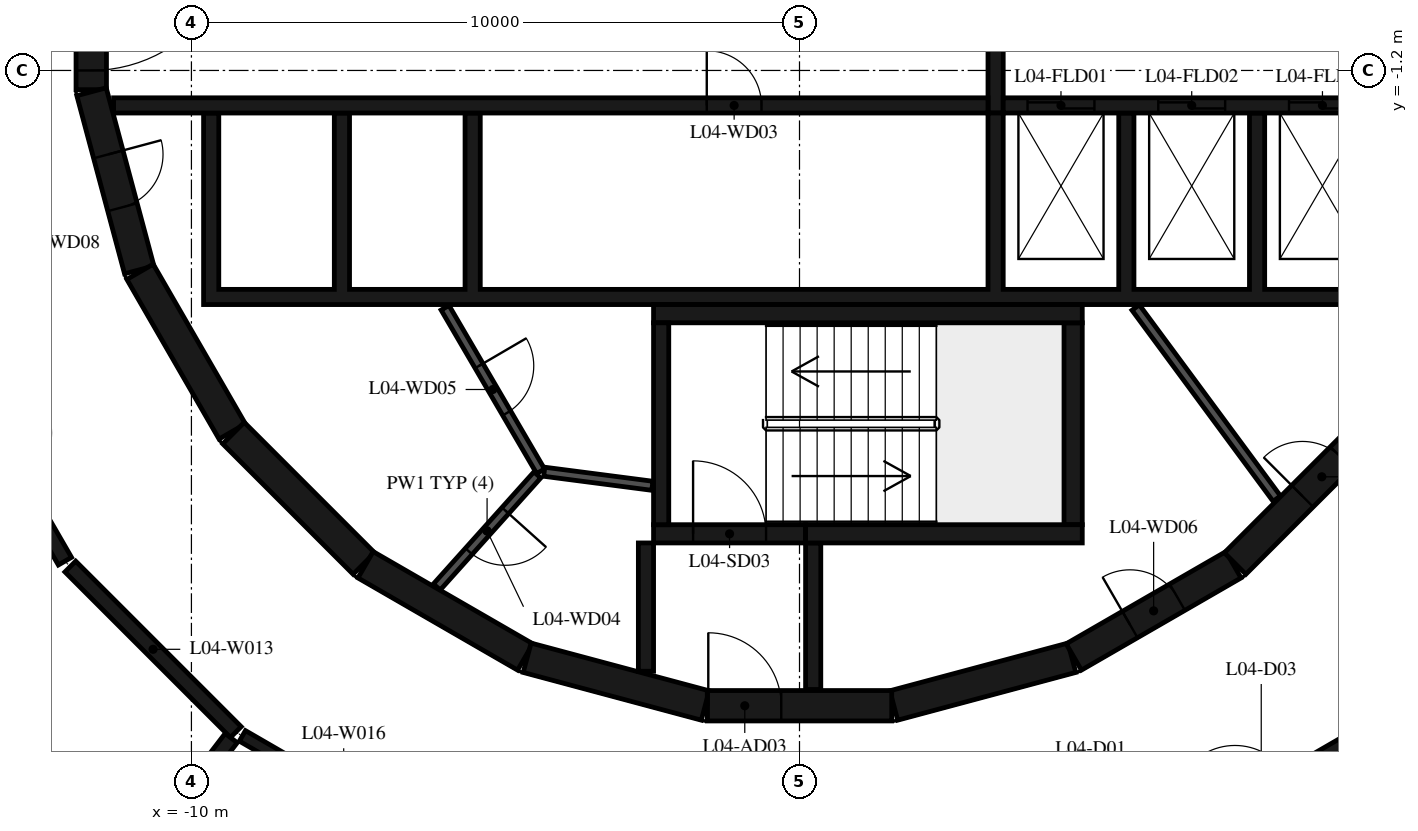
"""IFC4 building model, lengths in metres.
Left out: names, types, materials, properties, quantities, classifications, styles, units other than length and angle.
Written with IfcOpenShell. Run it as: python <this file> out.ifc"""

import sys

from ifc_helpers import new_model, si_unit, direction, frame, frame_2d, origin, place, context, subcontext, project, spatial, polyline, rectangle, outline, extrude, element, fill, save


model = new_model("IFC4")
c1 = context("Model", 3, precision=1e-05, world=origin(), true_north=direction((0.0, 1.0)))
c2 = subcontext(c1, "Body", "Model", "MODEL_VIEW")
j1 = project(units=[si_unit("LENGTHUNIT", "METRE"), si_unit("PLANEANGLEUNIT", "RADIAN")], contexts=[c1])
p1 = place(None, origin())
s1 = spatial("IfcSite", under=j1, at=p1, CompositionType="ELEMENT")
p2 = place(p1, origin())
s2 = spatial("IfcBuilding", under=s1, at=p2, CompositionType="ELEMENT")
p3 = place(p2, frame((0.0, 0.0, 23.4)))
s3 = spatial("IfcBuildingStorey", under=s2, at=p3, CompositionType="ELEMENT", Elevation=23.4)
p4 = place(p3, frame((1.55, -11.643, 0.0), z_axis=(0.0, 0.0, 1.0), x_axis=(0.965948410781, 0.258734743916, 0.0)))
e1 = element("IfcWall", 1, at=p4, inside=s3, PredefinedType="SHEAR", context=c2, shape_type="SweptSolid", body=[
    extrude(rectangle(XDim=3.033, YDim=0.5, at=frame_2d((1.516, 0.0))), origin(), (0.0, 0.0, 1.0), 4.42),
])
p5 = place(p3, frame((4.51, -10.845, 0.0), z_axis=(0.0, 0.0, 1.0), x_axis=(0.865975092491, 0.500087131594, 0.0)))
e2 = element("IfcWall", 2, at=p5, inside=s3, PredefinedType="SHEAR", context=c2, shape_type="SweptSolid", body=[
    extrude(rectangle(XDim=3.033, YDim=0.5, at=frame_2d((1.516, 0.0))), origin(), (0.0, 0.0, 1.0), 4.42),
])
p6 = place(p5, frame((1.066, 0.0, 0.0)))
e3 = element("IfcOpeningElement", 3, at=p6, cuts=e2, PredefinedType="OPENING", context=c2, shape_type="SweptSolid", body=[
    extrude(rectangle(XDim=0.9, YDim=2.1, at=frame_2d((0.45, 1.05))), frame((0.0, 0.26, 0.0), z_axis=(0.0, -1.0, 0.0), x_axis=(1.0, 0.0, 0.0)), (0.0, 0.0, 1.0), 0.52),
])
p7 = place(p3, frame((7.164, -9.308, 0.0), z_axis=(0.0, 0.0, 1.0), x_axis=(0.707106781187, 0.707106781187, 0.0)))
e4 = element("IfcWall", 4, at=p7, inside=s3, PredefinedType="SHEAR", context=c2, shape_type="SweptSolid", body=[
    extrude(rectangle(XDim=3.032, YDim=0.5, at=frame_2d((1.516, 0.0))), origin(), (0.0, 0.0, 1.0), 4.42),
])
p8 = place(p7, frame((1.566, 0.0, 0.0)))
e5 = element("IfcOpeningElement", 5, at=p8, cuts=e4, PredefinedType="OPENING", context=c2, shape_type="SweptSolid", body=[
    extrude(rectangle(XDim=0.9, YDim=2.1, at=frame_2d((0.45, 1.05))), frame((0.0, 0.26, 0.0), z_axis=(0.0, -1.0, 0.0), x_axis=(1.0, 0.0, 0.0)), (0.0, 0.0, 1.0), 0.52),
])
p9 = place(p3, frame((-11.647, 1.516, 0.0), z_axis=(0.0, 0.0, 1.0), x_axis=(0.0, -1.0, 0.0)))
e6 = element("IfcWall", 6, at=p9, inside=s3, PredefinedType="SHEAR", context=c2, shape_type="SweptSolid", body=[
    extrude(rectangle(XDim=3.033, YDim=0.5, at=frame_2d((1.516, 0.0))), origin(), (0.0, 0.0, 1.0), 4.42),
])
p10 = place(p9, frame((0.316, 0.0, 0.0)))
e7 = element("IfcOpeningElement", 7, at=p10, cuts=e6, PredefinedType="OPENING", context=c2, shape_type="SweptSolid", body=[
    extrude(rectangle(XDim=2.4, YDim=2.1, at=frame_2d((1.2, 1.05))), frame((0.0, 0.26, 0.0), z_axis=(0.0, -1.0, 0.0), x_axis=(1.0, 0.0, 0.0)), (0.0, 0.0, 1.0), 0.52),
])
p11 = place(p3, frame((-11.643, -1.55, 0.0), z_axis=(0.0, 0.0, 1.0), x_axis=(0.258734743916, -0.965948410781, 0.0)))
e8 = element("IfcWall", 8, at=p11, inside=s3, PredefinedType="SHEAR", context=c2, shape_type="SweptSolid", body=[
    extrude(rectangle(XDim=3.033, YDim=0.5, at=frame_2d((1.516, 0.0))), origin(), (0.0, 0.0, 1.0), 4.42),
])
p12 = place(p11, frame((1.066, 0.0, 0.0)))
e9 = element("IfcOpeningElement", 9, at=p12, cuts=e8, PredefinedType="OPENING", context=c2, shape_type="SweptSolid", body=[
    extrude(rectangle(XDim=0.9, YDim=2.1, at=frame_2d((0.45, 1.05))), frame((0.0, 0.26, 0.0), z_axis=(0.0, -1.0, 0.0), x_axis=(1.0, 0.0, 0.0)), (0.0, 0.0, 1.0), 0.52),
])
p13 = place(p3, frame((-10.845, -4.51, 0.0), z_axis=(0.0, 0.0, 1.0), x_axis=(0.500087131594, -0.865975092491, 0.0)))
e10 = element("IfcWall", 10, at=p13, inside=s3, PredefinedType="SHEAR", context=c2, shape_type="SweptSolid", body=[
    extrude(rectangle(XDim=3.033, YDim=0.5, at=frame_2d((1.516, 0.0))), origin(), (0.0, 0.0, 1.0), 4.42),
])
p14 = place(p3, frame((-9.308, -7.164, 0.0), z_axis=(0.0, 0.0, 1.0), x_axis=(0.707106781187, -0.707106781187, 0.0)))
e11 = element("IfcWall", 11, at=p14, inside=s3, PredefinedType="SHEAR", context=c2, shape_type="SweptSolid", body=[
    extrude(rectangle(XDim=3.032, YDim=0.5, at=frame_2d((1.516, 0.0))), origin(), (0.0, 0.0, 1.0), 4.42),
])
for number, where, z_axis, x_axis in (
    (12, (-7.137, -9.329, 0.0), (0.0, 0.0, 1.0), (0.866, -0.5, 0.0)),
    (13, (-4.479, -10.858, 0.0), (0.0, 0.0, 1.0), (0.966, -0.259, 0.0)),
):
    element("IfcWall", number, at=place(p3, frame(where, z_axis=z_axis, x_axis=x_axis)), inside=s3, PredefinedType="SHEAR", context=c2, shape_type="SweptSolid", body=[
        extrude(rectangle(XDim=3.033, YDim=0.5, at=frame_2d((1.516, 0.0))), origin(), (0.0, 0.0, 1.0), 4.42),
    ])
p15 = place(p3, frame((-1.516, -11.647, 0.0), z_axis=(0.0, 0.0, 1.0), x_axis=(1.0, 0.0, 0.0)))
e14 = element("IfcWall", 14, at=p15, inside=s3, PredefinedType="SHEAR", context=c2, shape_type="SweptSolid", body=[
    extrude(rectangle(XDim=3.033, YDim=0.5, at=frame_2d((1.516, 0.0))), origin(), (0.0, 0.0, 1.0), 4.42),
])
p16 = place(p15, frame((0.016, 0.0, 0.0)))
e15 = element("IfcOpeningElement", 15, at=p16, cuts=e14, PredefinedType="OPENING", context=c2, shape_type="SweptSolid", body=[
    extrude(rectangle(XDim=1.2, YDim=2.1, at=frame_2d((0.6, 1.05))), frame((0.0, 0.26, 0.0), z_axis=(0.0, -1.0, 0.0), x_axis=(1.0, 0.0, 0.0)), (0.0, 0.0, 1.0), 0.52),
])
p17 = place(p3, frame((-2.275, -8.67, 0.0), z_axis=(0.0, 0.0, 1.0), x_axis=(0.0, 1.0, 0.0)))
e16 = element("IfcWall", 16, at=p17, inside=s3, PredefinedType="SHEAR", context=c2, shape_type="SweptSolid", body=[
    extrude(rectangle(XDim=3.32, YDim=0.25, at=frame_2d((1.66, 0.0))), origin(), (0.0, 0.0, 1.0), 4.42),
])
p18 = place(p3, frame((-2.4, -5.2, 0.0), z_axis=(0.0, 0.0, 1.0), x_axis=(1.0, 0.0, 0.0)))
e17 = element("IfcWall", 17, at=p18, inside=s3, PredefinedType="SHEAR", context=c2, shape_type="SweptSolid", body=[
    extrude(rectangle(XDim=7.05, YDim=0.3, at=frame_2d((3.525, 0.0))), origin(), (0.0, 0.0, 1.0), 4.42),
])
p19 = place(p3, frame((4.5, -8.67, 0.0), z_axis=(0.0, 0.0, 1.0), x_axis=(0.0, 1.0, 0.0)))
e18 = element("IfcWall", 18, at=p19, inside=s3, PredefinedType="SHEAR", context=c2, shape_type="SweptSolid", body=[
    extrude(rectangle(XDim=3.32, YDim=0.3, at=frame_2d((1.66, 0.0))), origin(), (0.0, 0.0, 1.0), 4.42),
])
p20 = place(p3, frame((0.1, -8.82, 0.0), z_axis=(0.0, 0.0, 1.0), x_axis=(1.0, 0.0, 0.0)))
e19 = element("IfcWall", 19, at=p20, inside=s3, PredefinedType="SHEAR", context=c2, shape_type="SweptSolid", body=[
    extrude(rectangle(XDim=4.55, YDim=0.3, at=frame_2d((2.275, 0.0))), origin(), (0.0, 0.0, 1.0), 4.42),
])
p21 = place(p3, frame((-2.4, -8.82, 0.0), z_axis=(0.0, 0.0, 1.0), x_axis=(1.0, 0.0, 0.0)))
e20 = element("IfcWall", 20, at=p21, inside=s3, PredefinedType="SHEAR", context=c2, shape_type="SweptSolid", body=[
    extrude(rectangle(XDim=2.5, YDim=0.3, at=frame_2d((1.25, 0.0))), origin(), (0.0, 0.0, 1.0), 4.42),
])
p22 = place(p21, frame((0.65, 0.0, 0.0)))
e21 = element("IfcOpeningElement", 21, at=p22, cuts=e20, PredefinedType="OPENING", context=c2, shape_type="SweptSolid", body=[
    extrude(rectangle(XDim=1.2, YDim=2.1, at=frame_2d((0.6, 1.05))), frame((0.0, 0.16, 0.0), z_axis=(0.0, -1.0, 0.0), x_axis=(1.0, 0.0, 0.0)), (0.0, 0.0, 1.0), 0.32),
])
p23 = place(p3, frame((-2.525, -8.97, 0.0), z_axis=(0.0, 0.0, 1.0), x_axis=(0.0, -1.0, 0.0)))
e22 = element("IfcWall", 22, at=p23, inside=s3, PredefinedType="SHEAR", context=c2, shape_type="SweptSolid", body=[
    extrude(rectangle(XDim=2.11, YDim=0.25, at=frame_2d((1.055, 0.0))), origin(), (0.0, 0.0, 1.0), 4.42),
])
p24 = place(p3, frame((0.225, -8.97, 0.0), z_axis=(0.0, 0.0, 1.0), x_axis=(0.0, -1.0, 0.0)))
e23 = element("IfcWall", 23, at=p24, inside=s3, PredefinedType="SHEAR", context=c2, shape_type="SweptSolid", body=[
    extrude(rectangle(XDim=2.41, YDim=0.25, at=frame_2d((1.205, 0.0))), origin(), (0.0, 0.0, 1.0), 4.42),
])
p25 = place(p3, origin())
e24 = element("IfcWall", 24, at=p25, inside=s3, PredefinedType="SHEAR", context=c2, shape_type="SweptSolid", body=[
    extrude(outline(polyline([(9.8, -5.05), (9.8, -4.8), (9.8, -1.9), (9.55, -1.9), (9.55, -4.8), (7.65, -4.8), (7.65, -1.9), (7.4, -1.9), (7.4, -4.8), (5.5, -4.8), (5.5, -1.9), (5.25, -1.9), (5.25, -4.8), (3.35, -4.8), (3.35, -1.9), (3.1, -1.9), (3.1, -4.8), (-5.25, -4.8), (-5.25, -1.9), (-5.5, -1.9), (-5.5, -4.8), (-7.4, -4.8), (-7.4, -1.9), (-7.65, -1.9), (-7.65, -4.8), (-9.55, -4.8), (-9.55, -1.9), (-9.8, -1.9), (-9.8, -4.8), (-9.8, -5.05), (9.8, -5.05)])), origin(), (0.0, 0.0, 1.0), 4.42),
])
p26 = place(p3, frame((-11.28, -1.775, 0.0), z_axis=(0.0, 0.0, 1.0), x_axis=(1.0, 0.0, 0.0)))
e25 = element("IfcWall", 25, at=p26, inside=s3, PredefinedType="SHEAR", context=c2, shape_type="SweptSolid", body=[
    extrude(rectangle(XDim=14.38, YDim=0.25, at=frame_2d((7.19, 0.0))), origin(), (0.0, 0.0, 1.0), 4.42),
])
p27 = place(p26, frame((9.755, 0.0, 0.0)))
e26 = element("IfcOpeningElement", 26, at=p27, cuts=e25, PredefinedType="OPENING", context=c2, shape_type="SweptSolid", body=[
    extrude(rectangle(XDim=0.9, YDim=2.1, at=frame_2d((0.45, 1.05))), frame((0.0, 0.135, 0.0), z_axis=(0.0, -1.0, 0.0), x_axis=(1.0, 0.0, 0.0)), (0.0, 0.0, 1.0), 0.27),
])
p28 = place(p3, frame((3.35, -1.775, 0.0), z_axis=(0.0, 0.0, 1.0), x_axis=(1.0, 0.0, 0.0)))
e27 = element("IfcWall", 27, at=p28, inside=s3, PredefinedType="SHEAR", context=c2, shape_type="SweptSolid", body=[
    extrude(rectangle(XDim=7.93, YDim=0.25, at=frame_2d((3.965, 0.0))), origin(), (0.0, 0.0, 1.0), 4.42),
])
p29 = place(p28, frame((0.4, 0.0, 0.0)))
e28 = element("IfcOpeningElement", 28, at=p29, cuts=e27, PredefinedType="OPENING", context=c2, shape_type="SweptSolid", body=[
    extrude(rectangle(XDim=1.1, YDim=2.4, at=frame_2d((0.55, 1.2))), frame((0.0, 0.135, 0.0), z_axis=(0.0, -1.0, 0.0), x_axis=(1.0, 0.0, 0.0)), (0.0, 0.0, 1.0), 0.27),
])
p30 = place(p28, frame((2.55, 0.0, 0.0)))
e29 = element("IfcOpeningElement", 29, at=p30, cuts=e27, PredefinedType="OPENING", context=c2, shape_type="SweptSolid", body=[
    extrude(rectangle(XDim=1.1, YDim=2.4, at=frame_2d((0.55, 1.2))), frame((0.0, 0.135, 0.0), z_axis=(0.0, -1.0, 0.0), x_axis=(1.0, 0.0, 0.0)), (0.0, 0.0, 1.0), 0.27),
])
p31 = place(p28, frame((4.7, 0.0, 0.0)))
e30 = element("IfcOpeningElement", 30, at=p31, cuts=e27, PredefinedType="OPENING", context=c2, shape_type="SweptSolid", body=[
    extrude(rectangle(XDim=1.1, YDim=2.4, at=frame_2d((0.55, 1.2))), frame((0.0, 0.135, 0.0), z_axis=(0.0, -1.0, 0.0), x_axis=(1.0, 0.0, 0.0)), (0.0, 0.0, 1.0), 0.27),
])
p32 = place(p3, frame((3.225, -1.9, 0.0), z_axis=(0.0, 0.0, 1.0), x_axis=(0.0, 1.0, 0.0)))
e31 = element("IfcWall", 31, at=p32, inside=s3, PredefinedType="SHEAR", context=c2, shape_type="SweptSolid", body=[
    extrude(rectangle(XDim=3.8, YDim=0.25, at=frame_2d((1.9, 0.0))), origin(), (0.0, 0.0, 1.0), 4.42),
])
p33 = place(p3, frame((5.528, -5.098, 0.0), z_axis=(0.0, 0.0, 1.0), x_axis=(0.594034318069, -0.804439698769, 0.0)))
e32 = element("IfcWall", 32, at=p33, inside=s3, PredefinedType="PARTITIONING", context=c2, shape_type="SweptSolid", body=[
    extrude(rectangle(XDim=3.907, YDim=0.15, at=frame_2d((1.953, 0.0))), origin(), (0.0, 0.0, 1.0), 4.42),
])
p34 = place(p3, frame((-5.829, -5.102, 0.0), z_axis=(0.0, 0.0, 1.0), x_axis=(0.504480008384, -0.863423373057, 0.0)))
e33 = element("IfcWall", 33, at=p34, inside=s3, PredefinedType="PARTITIONING", context=c2, shape_type="SweptSolid", body=[
    extrude(rectangle(XDim=3.115, YDim=0.15, at=frame_2d((1.558, 0.0))), origin(), (0.0, 0.0, 1.0), 4.42),
])
p35 = place(p34, frame((1.107, 0.0, 0.0)))
e34 = element("IfcOpeningElement", 34, at=p35, cuts=e33, PredefinedType="OPENING", context=c2, shape_type="SweptSolid", body=[
    extrude(rectangle(XDim=0.9, YDim=2.1, at=frame_2d((0.45, 1.05))), frame((0.0, 0.085, 0.0), z_axis=(0.0, -1.0, 0.0), x_axis=(1.0, 0.0, 0.0)), (0.0, 0.0, 1.0), 0.17),
])
p36 = place(p3, frame((-4.311, -7.851, 0.0), z_axis=(0.0, 0.0, 1.0), x_axis=(-0.667869133096, -0.744278725383, 0.0)))
e35 = element("IfcWall", 35, at=p36, inside=s3, PredefinedType="PARTITIONING", context=c2, shape_type="SweptSolid", body=[
    extrude(rectangle(XDim=2.476, YDim=0.15, at=frame_2d((1.238, 0.0))), origin(), (0.0, 0.0, 1.0), 4.42),
])
p37 = place(p36, frame((0.788, 0.0, 0.0)))
e36 = element("IfcOpeningElement", 36, at=p37, cuts=e35, PredefinedType="OPENING", context=c2, shape_type="SweptSolid", body=[
    extrude(rectangle(XDim=0.9, YDim=2.1, at=frame_2d((0.45, 1.05))), frame((0.0, 0.085, 0.0), z_axis=(0.0, -1.0, 0.0), x_axis=(1.0, 0.0, 0.0)), (0.0, 0.0, 1.0), 0.17),
])
p38 = place(p3, frame((-4.198, -7.799, 0.0), z_axis=(0.0, 0.0, 1.0), x_axis=(0.991686747293, -0.128675542523, 0.0)))
e37 = element("IfcWall", 37, at=p38, inside=s3, PredefinedType="PARTITIONING", context=c2, shape_type="SweptSolid", body=[
    extrude(rectangle(XDim=1.793, YDim=0.15, at=frame_2d((0.896, 0.0))), origin(), (0.0, 0.0, 1.0), 4.42),
])
p39 = place(p3, frame((-14.02, -5.917, 0.0), z_axis=(0.0, 0.0, 1.0), x_axis=(0.500733182901, -0.865601686425, 0.0)))
e38 = element("IfcWall", 38, at=p39, inside=s3, PredefinedType="PARTITIONING", context=c2, shape_type="SweptSolid", body=[
    extrude(rectangle(XDim=3.874, YDim=0.25, at=frame_2d((1.937, 0.0))), origin(), (0.0, 0.0, 1.0), 4.42),
])
p40 = place(p39, frame((1.437, 0.0, 0.0)))
e39 = element("IfcOpeningElement", 39, at=p40, cuts=e38, PredefinedType="OPENING", context=c2, shape_type="SweptSolid", body=[
    extrude(rectangle(XDim=1.0, YDim=2.1, at=frame_2d((0.5, 1.05))), frame((0.0, 0.135, 0.0), z_axis=(0.0, -1.0, 0.0), x_axis=(1.0, 0.0, 0.0)), (0.0, 0.0, 1.0), 0.27),
])
p41 = place(p3, frame((-11.992, -9.358, 0.0), z_axis=(0.0, 0.0, 1.0), x_axis=(0.707106781187, -0.707106781187, 0.0)))
e40 = element("IfcWall", 40, at=p41, inside=s3, PredefinedType="PARTITIONING", context=c2, shape_type="SweptSolid", body=[
    extrude(rectangle(XDim=3.849, YDim=0.25, at=frame_2d((1.925, 0.0))), origin(), (0.0, 0.0, 1.0), 4.42),
])
p42 = place(p3, frame((-9.346, -12.179, 0.0), z_axis=(0.0, 0.0, 1.0), x_axis=(-0.608560359422, -0.793507585937, 0.0)))
e41 = element("IfcWall", 41, at=p42, inside=s3, PredefinedType="PARTITIONING", context=c2, shape_type="SweptSolid", body=[
    extrude(rectangle(XDim=9.39, YDim=0.25, at=frame_2d((4.695, 0.0))), origin(), (0.0, 0.0, 1.0), 4.42),
])
p43 = place(p3, frame((-9.162, -12.143, 0.0), z_axis=(0.0, 0.0, 1.0), x_axis=(0.865588360659, -0.500756218026, 0.0)))
e42 = element("IfcWall", 42, at=p43, inside=s3, PredefinedType="PARTITIONING", context=c2, shape_type="SweptSolid", body=[
    extrude(rectangle(XDim=3.849, YDim=0.2, at=frame_2d((1.925, 0.0))), origin(), (0.0, 0.0, 1.0), 4.42),
])
p44 = place(p3, frame((5.917, -14.02, 0.0), z_axis=(0.0, 0.0, 1.0), x_axis=(0.865601686425, 0.500733182901, 0.0)))
e43 = element("IfcWall", 43, at=p44, inside=s3, PredefinedType="PARTITIONING", context=c2, shape_type="SweptSolid", body=[
    extrude(rectangle(XDim=3.874, YDim=0.2, at=frame_2d((1.937, 0.0))), origin(), (0.0, 0.0, 1.0), 4.42),
])
p45 = place(p44, frame((1.437, 0.0, 0.0)))
e44 = element("IfcOpeningElement", 44, at=p45, cuts=e43, PredefinedType="OPENING", context=c2, shape_type="SweptSolid", body=[
    extrude(rectangle(XDim=1.0, YDim=2.1, at=frame_2d((0.5, 1.05))), frame((0.0, 0.11, 0.0), z_axis=(0.0, -1.0, 0.0), x_axis=(1.0, 0.0, 0.0)), (0.0, 0.0, 1.0), 0.22),
])
p46 = place(p22, origin())
e45 = element("IfcDoor", 45, at=p46, inside=s3, OperationType="SINGLE_SWING_LEFT", PredefinedType="DOOR", context=c2, shape_type="SweptSolid", body=[
    extrude(rectangle(XDim=1.2, YDim=2.1, at=frame_2d((0.6, 1.05))), frame((0.0, 0.025, 0.0), z_axis=(0.0, -1.0, 0.0), x_axis=(1.0, 0.0, 0.0)), (0.0, 0.0, 1.0), 0.05),
])
fill(e21, e45)
p47 = place(p16, origin())
e46 = element("IfcDoor", 46, at=p47, inside=s3, OperationType="SINGLE_SWING_RIGHT", PredefinedType="DOOR", context=c2, shape_type="SweptSolid", body=[
    extrude(rectangle(XDim=1.2, YDim=2.1, at=frame_2d((0.6, 1.05))), frame((0.0, 0.025, 0.0), z_axis=(0.0, -1.0, 0.0), x_axis=(1.0, 0.0, 0.0)), (0.0, 0.0, 1.0), 0.05),
])
fill(e15, e46)
p48 = place(p10, origin())
e47 = element("IfcDoor", 47, at=p48, inside=s3, OperationType="DOUBLE_DOOR_SINGLE_SWING", PredefinedType="DOOR", context=c2, shape_type="SweptSolid", body=[
    extrude(rectangle(XDim=2.4, YDim=2.1, at=frame_2d((1.2, 1.05))), frame((0.0, 0.025, 0.0), z_axis=(0.0, -1.0, 0.0), x_axis=(1.0, 0.0, 0.0)), (0.0, 0.0, 1.0), 0.05),
])
fill(e7, e47)
p49 = place(p29, origin())
e48 = element("IfcDoor", 48, at=p49, inside=s3, OperationType="DOUBLE_DOOR_SLIDING", PredefinedType="DOOR", context=c2, shape_type="SweptSolid", body=[
    extrude(rectangle(XDim=1.1, YDim=2.4, at=frame_2d((0.55, 1.2))), frame((0.0, 0.025, 0.0), z_axis=(0.0, -1.0, 0.0), x_axis=(1.0, 0.0, 0.0)), (0.0, 0.0, 1.0), 0.05),
])
fill(e28, e48)
p50 = place(p30, origin())
e49 = element("IfcDoor", 49, at=p50, inside=s3, OperationType="DOUBLE_DOOR_SLIDING", PredefinedType="DOOR", context=c2, shape_type="SweptSolid", body=[
    extrude(rectangle(XDim=1.1, YDim=2.4, at=frame_2d((0.55, 1.2))), frame((0.0, 0.025, 0.0), z_axis=(0.0, -1.0, 0.0), x_axis=(1.0, 0.0, 0.0)), (0.0, 0.0, 1.0), 0.05),
])
fill(e29, e49)
p51 = place(p31, origin())
e50 = element("IfcDoor", 50, at=p51, inside=s3, OperationType="DOUBLE_DOOR_SLIDING", PredefinedType="DOOR", context=c2, shape_type="SweptSolid", body=[
    extrude(rectangle(XDim=1.1, YDim=2.4, at=frame_2d((0.55, 1.2))), frame((0.0, 0.025, 0.0), z_axis=(0.0, -1.0, 0.0), x_axis=(1.0, 0.0, 0.0)), (0.0, 0.0, 1.0), 0.05),
])
fill(e30, e50)
p52 = place(p27, origin())
e51 = element("IfcDoor", 51, at=p52, inside=s3, OperationType="SINGLE_SWING_RIGHT", PredefinedType="DOOR", context=c2, shape_type="SweptSolid", body=[
    extrude(rectangle(XDim=0.9, YDim=2.1, at=frame_2d((0.45, 1.05))), frame((0.0, 0.025, 0.0), z_axis=(0.0, -1.0, 0.0), x_axis=(1.0, 0.0, 0.0)), (0.0, 0.0, 1.0), 0.05),
])
fill(e26, e51)
p53 = place(p37, origin())
e52 = element("IfcDoor", 52, at=p53, inside=s3, OperationType="SINGLE_SWING_LEFT", PredefinedType="DOOR", context=c2, shape_type="SweptSolid", body=[
    extrude(rectangle(XDim=0.9, YDim=2.1, at=frame_2d((0.45, 1.05))), frame((0.0, 0.025, 0.0), z_axis=(0.0, -1.0, 0.0), x_axis=(1.0, 0.0, 0.0)), (0.0, 0.0, 1.0), 0.05),
])
fill(e36, e52)
p54 = place(p35, origin())
e53 = element("IfcDoor", 53, at=p54, inside=s3, OperationType="SINGLE_SWING_RIGHT", PredefinedType="DOOR", context=c2, shape_type="SweptSolid", body=[
    extrude(rectangle(XDim=0.9, YDim=2.1, at=frame_2d((0.45, 1.05))), frame((0.0, 0.025, 0.0), z_axis=(0.0, -1.0, 0.0), x_axis=(1.0, 0.0, 0.0)), (0.0, 0.0, 1.0), 0.05),
])
fill(e34, e53)
p55 = place(p6, origin())
e54 = element("IfcDoor", 54, at=p55, inside=s3, OperationType="SINGLE_SWING_LEFT", PredefinedType="DOOR", context=c2, shape_type="SweptSolid", body=[
    extrude(rectangle(XDim=0.9, YDim=2.1, at=frame_2d((0.45, 1.05))), frame((0.0, 0.025, 0.0), z_axis=(0.0, -1.0, 0.0), x_axis=(1.0, 0.0, 0.0)), (0.0, 0.0, 1.0), 0.05),
])
fill(e3, e54)
p56 = place(p8, origin())
e55 = element("IfcDoor", 55, at=p56, inside=s3, OperationType="SINGLE_SWING_RIGHT", PredefinedType="DOOR", context=c2, shape_type="SweptSolid", body=[
    extrude(rectangle(XDim=0.9, YDim=2.1, at=frame_2d((0.45, 1.05))), frame((0.0, 0.025, 0.0), z_axis=(0.0, -1.0, 0.0), x_axis=(1.0, 0.0, 0.0)), (0.0, 0.0, 1.0), 0.05),
])
fill(e5, e55)
p57 = place(p12, origin())
e56 = element("IfcDoor", 56, at=p57, inside=s3, OperationType="SINGLE_SWING_LEFT", PredefinedType="DOOR", context=c2, shape_type="SweptSolid", body=[
    extrude(rectangle(XDim=0.9, YDim=2.1, at=frame_2d((0.45, 1.05))), frame((0.0, 0.025, 0.0), z_axis=(0.0, -1.0, 0.0), x_axis=(1.0, 0.0, 0.0)), (0.0, 0.0, 1.0), 0.05),
])
fill(e9, e56)
save(model, sys.argv[1])
